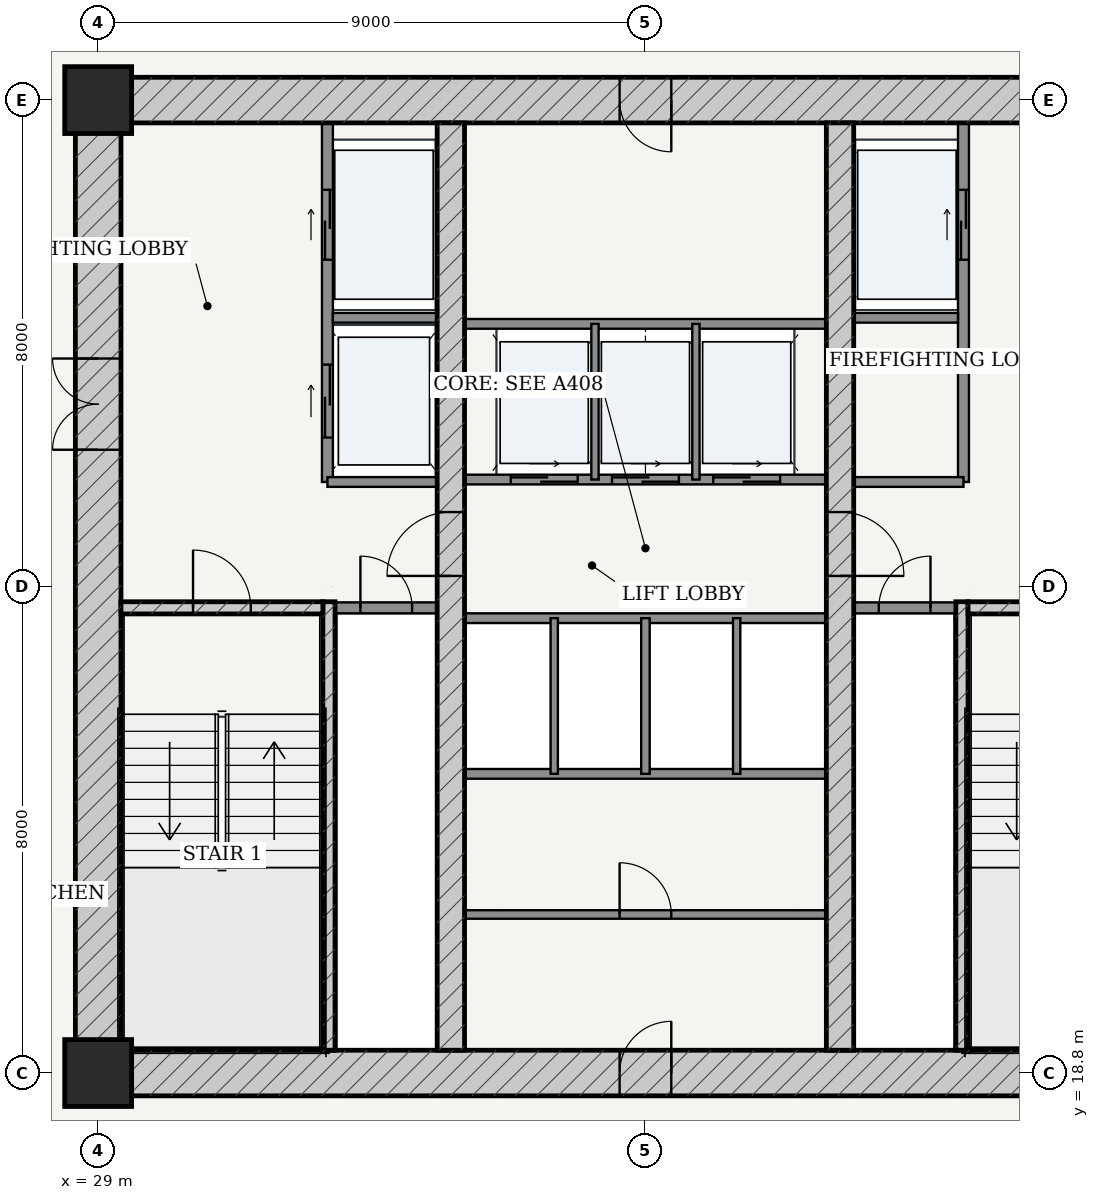
"""IFC4 building model, lengths in metres.
Left out: names, types, materials, properties, quantities, classifications, styles, units other than length and angle.
Written with IfcOpenShell. Run it as: python <this file> out.ifc"""

import sys

from ifc_helpers import new_model, si_unit, direction, frame, frame_2d, origin, origin_2d, place, context, subcontext, project, spatial, rectangle, extrude, source, transform, mapped, element, fill, save


model = new_model("IFC4")
c1 = context("Model", 3, precision=1e-05, world=origin(), true_north=direction((-0.2419218956, 0.970295726276)))
c2 = subcontext(c1, "Body", "Model", "MODEL_VIEW")
j1 = project(units=[si_unit("LENGTHUNIT", "METRE"), si_unit("PLANEANGLEUNIT", "RADIAN")], contexts=[c1])
p1 = place(None, origin())
s1 = spatial("IfcSite", under=j1, at=p1, CompositionType="ELEMENT")
p2 = place(p1, origin())
s2 = spatial("IfcBuilding", under=s1, at=p2, CompositionType="ELEMENT")
p3 = place(p2, frame((0.0, 0.0, 24.0)))
s3 = spatial("IfcBuildingStorey", under=s2, at=p3, CompositionType="ELEMENT", Elevation=24.0)
for number, where, z_axis, x_axis in (
    (1, (29.0, 18.8, 0.0), (0.0, 0.0, 1.0), (1.0, 0.0, 0.0)),
    (2, (29.0, 34.8, 0.0), (0.0, 0.0, 1.0), (1.0, 0.0, 0.0)),
):
    element("IfcColumn", number, at=place(p3, frame(where, z_axis=z_axis, x_axis=x_axis)), inside=s3, PredefinedType="COLUMN", context=c2, shape_type="SweptSolid", body=[
        extrude(rectangle(XDim=1.1, YDim=1.1, at=origin_2d()), origin(), (0.0, 0.0, 1.0), 3.6),
    ])
p4 = place(p3, frame((28.625, 18.8, 0.0), z_axis=(0.0, 0.0, 1.0), x_axis=(1.0, 0.0, 0.0)))
e3 = element("IfcWall", 3, at=p4, inside=s3, PredefinedType="SHEAR", context=c2, shape_type="SweptSolid", body=[
    extrude(rectangle(XDim=18.75, YDim=0.75, at=frame_2d((9.375, 0.0))), origin(), (0.0, 0.0, 1.0), 3.32),
])
p5 = place(p4, frame((8.95, 0.0, 0.0)))
e4 = element("IfcOpeningElement", 4, at=p5, cuts=e3, PredefinedType="OPENING", context=c2, shape_type="SweptSolid", body=[
    extrude(rectangle(XDim=0.85, YDim=2.1, at=frame_2d((0.425, 1.05))), frame((0.0, 0.385, 0.0), z_axis=(0.0, -1.0, 0.0), x_axis=(1.0, 0.0, 0.0)), (0.0, 0.0, 1.0), 0.77),
])
p6 = place(p3, frame((28.625, 34.8, 0.0), z_axis=(0.0, 0.0, 1.0), x_axis=(1.0, 0.0, 0.0)))
e5 = element("IfcWall", 5, at=p6, inside=s3, PredefinedType="SHEAR", context=c2, shape_type="SweptSolid", body=[
    extrude(rectangle(XDim=18.75, YDim=0.75, at=frame_2d((9.375, 0.0))), origin(), (0.0, 0.0, 1.0), 3.32),
])
p7 = place(p6, frame((8.95, 0.0, 0.0)))
e6 = element("IfcOpeningElement", 6, at=p7, cuts=e5, PredefinedType="OPENING", context=c2, shape_type="SweptSolid", body=[
    extrude(rectangle(XDim=0.85, YDim=2.1, at=frame_2d((0.425, 1.05))), frame((0.0, 0.385, 0.0), z_axis=(0.0, -1.0, 0.0), x_axis=(1.0, 0.0, 0.0)), (0.0, 0.0, 1.0), 0.77),
])
p8 = place(p3, frame((29.0, 19.175, 0.0), z_axis=(0.0, 0.0, 1.0), x_axis=(0.0, 1.0, 0.0)))
e7 = element("IfcWall", 7, at=p8, inside=s3, PredefinedType="SHEAR", context=c2, shape_type="SweptSolid", body=[
    extrude(rectangle(XDim=15.25, YDim=0.75, at=frame_2d((7.625, 0.0))), origin(), (0.0, 0.0, 1.0), 3.32),
])
p9 = place(p8, frame((9.875, 0.0, 0.0)))
e8 = element("IfcOpeningElement", 8, at=p9, cuts=e7, PredefinedType="OPENING", context=c2, shape_type="SweptSolid", body=[
    extrude(rectangle(XDim=1.5, YDim=2.2, at=frame_2d((0.75, 1.1))), frame((0.0, 0.385, 0.0), z_axis=(0.0, -1.0, 0.0), x_axis=(1.0, 0.0, 0.0)), (0.0, 0.0, 1.0), 0.77),
])
p10 = place(p3, frame((32.795, 19.175, 0.0), z_axis=(0.0, 0.0, 1.0), x_axis=(0.0, 1.0, 0.0)))
e9 = element("IfcWall", 9, at=p10, inside=s3, PredefinedType="SOLIDWALL", context=c2, shape_type="SweptSolid", body=[
    extrude(rectangle(XDim=7.375, YDim=0.2, at=frame_2d((3.688, 0.0))), origin(), (0.0, 0.0, 1.0), 3.32),
])
p11 = place(p3, frame((29.375, 26.45, 0.0), z_axis=(0.0, 0.0, 1.0), x_axis=(1.0, 0.0, 0.0)))
e10 = element("IfcWall", 10, at=p11, inside=s3, PredefinedType="SOLIDWALL", context=c2, shape_type="SweptSolid", body=[
    extrude(rectangle(XDim=3.32, YDim=0.2, at=frame_2d((1.66, 0.0))), origin(), (0.0, 0.0, 1.0), 3.32),
])
p12 = place(p11, frame((1.185, 0.0, 0.0)))
e11 = element("IfcOpeningElement", 11, at=p12, cuts=e10, PredefinedType="OPENING", context=c2, shape_type="SweptSolid", body=[
    extrude(rectangle(XDim=0.95, YDim=2.15, at=frame_2d((0.475, 1.075))), frame((0.0, 0.11, 0.0), z_axis=(0.0, -1.0, 0.0), x_axis=(1.0, 0.0, 0.0)), (0.0, 0.0, 1.0), 0.22),
])
p13 = place(p3, frame((43.205, 19.175, 0.0), z_axis=(0.0, 0.0, 1.0), x_axis=(0.0, 1.0, 0.0)))
e12 = element("IfcWall", 12, at=p13, inside=s3, PredefinedType="SOLIDWALL", context=c2, shape_type="SweptSolid", body=[
    extrude(rectangle(XDim=7.375, YDim=0.2, at=frame_2d((3.688, 0.0))), origin(), (0.0, 0.0, 1.0), 3.32),
])
p14 = place(p3, frame((43.305, 26.45, 0.0), z_axis=(0.0, 0.0, 1.0), x_axis=(1.0, 0.0, 0.0)))
e13 = element("IfcWall", 13, at=p14, inside=s3, PredefinedType="SOLIDWALL", context=c2, shape_type="SweptSolid", body=[
    extrude(rectangle(XDim=3.32, YDim=0.2, at=frame_2d((1.66, 0.0))), origin(), (0.0, 0.0, 1.0), 3.32),
])
p15 = place(p14, frame((1.185, 0.0, 0.0)))
e14 = element("IfcOpeningElement", 14, at=p15, cuts=e13, PredefinedType="OPENING", context=c2, shape_type="SweptSolid", body=[
    extrude(rectangle(XDim=0.95, YDim=2.15, at=frame_2d((0.475, 1.075))), frame((0.0, 0.11, 0.0), z_axis=(0.0, -1.0, 0.0), x_axis=(1.0, 0.0, 0.0)), (0.0, 0.0, 1.0), 0.22),
])
p16 = place(p3, frame((34.8, 19.175, 0.0), z_axis=(0.0, 0.0, 1.0), x_axis=(0.0, 1.0, 0.0)))
e15 = element("IfcWall", 15, at=p16, inside=s3, PredefinedType="SHEAR", context=c2, shape_type="SweptSolid", body=[
    extrude(rectangle(XDim=15.25, YDim=0.45, at=frame_2d((7.625, 0.0))), origin(), (0.0, 0.0, 1.0), 3.32),
])
p17 = place(p16, frame((7.8, 0.0, 0.0)))
e16 = element("IfcOpeningElement", 16, at=p17, cuts=e15, PredefinedType="OPENING", context=c2, shape_type="SweptSolid", body=[
    extrude(rectangle(XDim=1.05, YDim=2.15, at=frame_2d((0.525, 1.075))), frame((0.0, 0.235, 0.0), z_axis=(0.0, -1.0, 0.0), x_axis=(1.0, 0.0, 0.0)), (0.0, 0.0, 1.0), 0.47),
])
p18 = place(p3, frame((41.2, 19.175, 0.0), z_axis=(0.0, 0.0, 1.0), x_axis=(0.0, 1.0, 0.0)))
e17 = element("IfcWall", 17, at=p18, inside=s3, PredefinedType="SHEAR", context=c2, shape_type="SweptSolid", body=[
    extrude(rectangle(XDim=15.25, YDim=0.45, at=frame_2d((7.625, 0.0))), origin(), (0.0, 0.0, 1.0), 3.32),
])
p19 = place(p18, frame((7.8, 0.0, 0.0)))
e18 = element("IfcOpeningElement", 18, at=p19, cuts=e17, PredefinedType="OPENING", context=c2, shape_type="SweptSolid", body=[
    extrude(rectangle(XDim=1.05, YDim=2.15, at=frame_2d((0.525, 1.075))), frame((0.0, 0.235, 0.0), z_axis=(0.0, -1.0, 0.0), x_axis=(1.0, 0.0, 0.0)), (0.0, 0.0, 1.0), 0.47),
])
p20 = place(p3, frame((32.9, 26.45, 0.0), z_axis=(0.0, 0.0, 1.0), x_axis=(1.0, 0.0, 0.0)))
e19 = element("IfcWall", 19, at=p20, inside=s3, PredefinedType="PARTITIONING", context=c2, shape_type="SweptSolid", body=[
    extrude(rectangle(XDim=1.675, YDim=0.18, at=frame_2d((0.837, 0.0))), origin(), (0.0, 0.0, 1.0), 3.32),
])
p21 = place(p20, frame((0.413, 0.0, 0.0)))
e20 = element("IfcOpeningElement", 20, at=p21, cuts=e19, PredefinedType="OPENING", context=c2, shape_type="SweptSolid", body=[
    extrude(rectangle(XDim=0.85, YDim=2.1, at=frame_2d((0.425, 1.05))), frame((0.0, 0.1, 0.0), z_axis=(0.0, -1.0, 0.0), x_axis=(1.0, 0.0, 0.0)), (0.0, 0.0, 1.0), 0.2),
])
p22 = place(p3, frame((41.425, 26.45, 0.0), z_axis=(0.0, 0.0, 1.0), x_axis=(1.0, 0.0, 0.0)))
e21 = element("IfcWall", 21, at=p22, inside=s3, PredefinedType="PARTITIONING", context=c2, shape_type="SweptSolid", body=[
    extrude(rectangle(XDim=1.675, YDim=0.18, at=frame_2d((0.837, 0.0))), origin(), (0.0, 0.0, 1.0), 3.32),
])
p23 = place(p22, frame((0.413, 0.0, 0.0)))
e22 = element("IfcOpeningElement", 22, at=p23, cuts=e21, PredefinedType="OPENING", context=c2, shape_type="SweptSolid", body=[
    extrude(rectangle(XDim=0.85, YDim=2.1, at=frame_2d((0.425, 1.05))), frame((0.0, 0.1, 0.0), z_axis=(0.0, -1.0, 0.0), x_axis=(1.0, 0.0, 0.0)), (0.0, 0.0, 1.0), 0.2),
])
p24 = place(p3, frame((32.77, 28.52, 0.0), z_axis=(0.0, 0.0, 1.0), x_axis=(0.0, 1.0, 0.0)))
e23 = element("IfcWall", 23, at=p24, inside=s3, PredefinedType="PARTITIONING", context=c2, shape_type="SweptSolid", body=[
    extrude(rectangle(XDim=5.905, YDim=0.18, at=frame_2d((2.953, 0.0))), origin(), (0.0, 0.0, 1.0), 3.32),
])
p25 = place(p24, frame((3.655, 0.0, 0.0)))
e24 = element("IfcOpeningElement", 24, at=p25, cuts=e23, PredefinedType="OPENING", context=c2, shape_type="SweptSolid", body=[
    extrude(rectangle(XDim=1.15, YDim=2.2, at=frame_2d((0.575, 1.1))), frame((0.0, 0.1, 0.0), z_axis=(0.0, -1.0, 0.0), x_axis=(1.0, 0.0, 0.0)), (0.0, 0.0, 1.0), 0.2),
])
p26 = place(p24, frame((0.73, 0.0, 0.0)))
e25 = element("IfcOpeningElement", 25, at=p26, cuts=e23, PredefinedType="OPENING", context=c2, shape_type="SweptSolid", body=[
    extrude(rectangle(XDim=1.2, YDim=2.25, at=frame_2d((0.6, 1.125))), frame((0.0, 0.1, 0.0), z_axis=(0.0, -1.0, 0.0), x_axis=(1.0, 0.0, 0.0)), (0.0, 0.0, 1.0), 0.2),
])
p27 = place(p3, frame((32.86, 31.22, 0.0), z_axis=(0.0, 0.0, 1.0), x_axis=(1.0, 0.0, 0.0)))
e26 = element("IfcWall", 26, at=p27, inside=s3, PredefinedType="PARTITIONING", context=c2, shape_type="SweptSolid", body=[
    extrude(rectangle(XDim=1.715, YDim=0.16, at=frame_2d((0.857, 0.0))), origin(), (0.0, 0.0, 1.0), 3.32),
])
p28 = place(p3, frame((32.77, 28.52, 0.0), z_axis=(0.0, 0.0, 1.0), x_axis=(1.0, 0.0, 0.0)))
e27 = element("IfcWall", 27, at=p28, inside=s3, PredefinedType="PARTITIONING", context=c2, shape_type="SweptSolid", body=[
    extrude(rectangle(XDim=1.805, YDim=0.16, at=frame_2d((0.902, 0.0))), origin(), (0.0, 0.0, 1.0), 3.32),
])
p29 = place(p3, frame((43.23, 28.52, 0.0), z_axis=(0.0, 0.0, 1.0), x_axis=(0.0, 1.0, 0.0)))
e28 = element("IfcWall", 28, at=p29, inside=s3, PredefinedType="PARTITIONING", context=c2, shape_type="SweptSolid", body=[
    extrude(rectangle(XDim=5.905, YDim=0.18, at=frame_2d((2.953, 0.0))), origin(), (0.0, 0.0, 1.0), 3.32),
])
p30 = place(p29, frame((3.655, 0.0, 0.0)))
e29 = element("IfcOpeningElement", 29, at=p30, cuts=e28, PredefinedType="OPENING", context=c2, shape_type="SweptSolid", body=[
    extrude(rectangle(XDim=1.15, YDim=2.2, at=frame_2d((0.575, 1.1))), frame((0.0, 0.1, 0.0), z_axis=(0.0, -1.0, 0.0), x_axis=(1.0, 0.0, 0.0)), (0.0, 0.0, 1.0), 0.2),
])
p31 = place(p3, frame((41.425, 31.22, 0.0), z_axis=(0.0, 0.0, 1.0), x_axis=(1.0, 0.0, 0.0)))
e30 = element("IfcWall", 30, at=p31, inside=s3, PredefinedType="PARTITIONING", context=c2, shape_type="SweptSolid", body=[
    extrude(rectangle(XDim=1.715, YDim=0.16, at=frame_2d((0.857, 0.0))), origin(), (0.0, 0.0, 1.0), 3.32),
])
p32 = place(p3, frame((41.425, 28.52, 0.0), z_axis=(0.0, 0.0, 1.0), x_axis=(1.0, 0.0, 0.0)))
e31 = element("IfcWall", 31, at=p32, inside=s3, PredefinedType="PARTITIONING", context=c2, shape_type="SweptSolid", body=[
    extrude(rectangle(XDim=1.805, YDim=0.16, at=frame_2d((0.902, 0.0))), origin(), (0.0, 0.0, 1.0), 3.32),
])
p33 = place(p3, frame((35.025, 28.56, 0.0), z_axis=(0.0, 0.0, 1.0), x_axis=(1.0, 0.0, 0.0)))
e32 = element("IfcWall", 32, at=p33, inside=s3, PredefinedType="PARTITIONING", context=c2, shape_type="SweptSolid", body=[
    extrude(rectangle(XDim=5.95, YDim=0.16, at=frame_2d((2.975, 0.0))), origin(), (0.0, 0.0, 1.0), 3.32),
])
p34 = place(p33, frame((0.76, 0.0, 0.0)))
e33 = element("IfcOpeningElement", 33, at=p34, cuts=e32, PredefinedType="OPENING", context=c2, shape_type="SweptSolid", body=[
    extrude(rectangle(XDim=1.1, YDim=2.2, at=frame_2d((0.55, 1.1))), frame((0.0, 0.09, 0.0), z_axis=(0.0, -1.0, 0.0), x_axis=(1.0, 0.0, 0.0)), (0.0, 0.0, 1.0), 0.18),
])
p35 = place(p33, frame((2.425, 0.0, 0.0)))
e34 = element("IfcOpeningElement", 34, at=p35, cuts=e32, PredefinedType="OPENING", context=c2, shape_type="SweptSolid", body=[
    extrude(rectangle(XDim=1.1, YDim=2.2, at=frame_2d((0.55, 1.1))), frame((0.0, 0.09, 0.0), z_axis=(0.0, -1.0, 0.0), x_axis=(1.0, 0.0, 0.0)), (0.0, 0.0, 1.0), 0.18),
])
p36 = place(p33, frame((4.09, 0.0, 0.0)))
e35 = element("IfcOpeningElement", 35, at=p36, cuts=e32, PredefinedType="OPENING", context=c2, shape_type="SweptSolid", body=[
    extrude(rectangle(XDim=1.1, YDim=2.2, at=frame_2d((0.55, 1.1))), frame((0.0, 0.09, 0.0), z_axis=(0.0, -1.0, 0.0), x_axis=(1.0, 0.0, 0.0)), (0.0, 0.0, 1.0), 0.18),
])
p37 = place(p3, frame((35.025, 31.12, 0.0), z_axis=(0.0, 0.0, 1.0), x_axis=(1.0, 0.0, 0.0)))
e36 = element("IfcWall", 36, at=p37, inside=s3, PredefinedType="PARTITIONING", context=c2, shape_type="SweptSolid", body=[
    extrude(rectangle(XDim=5.95, YDim=0.16, at=frame_2d((2.975, 0.0))), origin(), (0.0, 0.0, 1.0), 3.32),
])
for number, where, z_axis, x_axis in (
    (37, (37.17, 28.56, 0.0), (0.0, 0.0, 1.0), (0.0, 1.0, 0.0)),
    (38, (38.83, 28.56, 0.0), (0.0, 0.0, 1.0), (0.0, 1.0, 0.0)),
):
    element("IfcWall", number, at=place(p3, frame(where, z_axis=z_axis, x_axis=x_axis)), inside=s3, PredefinedType="PARTITIONING", context=c2, shape_type="SweptSolid", body=[
        extrude(rectangle(XDim=2.56, YDim=0.12, at=frame_2d((1.28, 0.0))), origin(), (0.0, 0.0, 1.0), 3.32),
    ])
for number, where, z_axis, x_axis in (
    (39, (35.025, 26.28, 0.0), (0.0, 0.0, 1.0), (1.0, 0.0, 0.0)),
    (40, (35.025, 23.72, 0.0), (0.0, 0.0, 1.0), (1.0, 0.0, 0.0)),
):
    element("IfcWall", number, at=place(p3, frame(where, z_axis=z_axis, x_axis=x_axis)), inside=s3, PredefinedType="PARTITIONING", context=c2, shape_type="SweptSolid", body=[
        extrude(rectangle(XDim=5.95, YDim=0.16, at=frame_2d((2.975, 0.0))), origin(), (0.0, 0.0, 1.0), 3.32),
    ])
p38 = place(p3, frame((36.5, 23.72, 0.0), z_axis=(0.0, 0.0, 1.0), x_axis=(0.0, 1.0, 0.0)))
e41 = element("IfcWall", 41, at=p38, inside=s3, PredefinedType="PARTITIONING", context=c2, shape_type="SweptSolid", body=[
    extrude(rectangle(XDim=2.56, YDim=0.12, at=frame_2d((1.28, 0.0))), origin(), (0.0, 0.0, 1.0), 3.32),
])
p39 = place(p3, frame((38.0, 23.72, 0.0), z_axis=(0.0, 0.0, 1.0), x_axis=(0.0, 1.0, 0.0)))
e42 = element("IfcWall", 42, at=p39, inside=s3, PredefinedType="PARTITIONING", context=c2, shape_type="SweptSolid", body=[
    extrude(rectangle(XDim=2.56, YDim=0.14, at=frame_2d((1.28, 0.0))), origin(), (0.0, 0.0, 1.0), 3.32),
])
p40 = place(p3, frame((39.5, 23.72, 0.0), z_axis=(0.0, 0.0, 1.0), x_axis=(0.0, 1.0, 0.0)))
e43 = element("IfcWall", 43, at=p40, inside=s3, PredefinedType="PARTITIONING", context=c2, shape_type="SweptSolid", body=[
    extrude(rectangle(XDim=2.56, YDim=0.12, at=frame_2d((1.28, 0.0))), origin(), (0.0, 0.0, 1.0), 3.32),
])
p41 = place(p3, frame((35.025, 21.407, 0.0), z_axis=(0.0, 0.0, 1.0), x_axis=(1.0, 0.0, 0.0)))
e44 = element("IfcWall", 44, at=p41, inside=s3, PredefinedType="PARTITIONING", context=c2, shape_type="SweptSolid", body=[
    extrude(rectangle(XDim=5.95, YDim=0.14, at=frame_2d((2.975, 0.0))), origin(), (0.0, 0.0, 1.0), 3.32),
])
p42 = place(p41, frame((2.55, 0.0, 0.0)))
e45 = element("IfcOpeningElement", 45, at=p42, cuts=e44, PredefinedType="OPENING", context=c2, shape_type="SweptSolid", body=[
    extrude(rectangle(XDim=0.85, YDim=2.1, at=frame_2d((0.425, 1.05))), frame((0.0, 0.08, 0.0), z_axis=(0.0, -1.0, 0.0), x_axis=(1.0, 0.0, 0.0)), (0.0, 0.0, 1.0), 0.16),
])
m1 = source(origin(), c2, "Body", "SweptSolid", [
    extrude(rectangle(XDim=1.5, YDim=2.2, at=frame_2d((0.75, 1.1))), frame((0.0, 0.025, 0.0), z_axis=(0.0, -1.0, 0.0), x_axis=(1.0, 0.0, 0.0)), (0.0, 0.0, 1.0), 0.05),
])
p43 = place(p9, origin())
e46 = element("IfcDoor", 46, at=p43, inside=s3, OperationType="DOUBLE_DOOR_SINGLE_SWING", PredefinedType="DOOR", context=c2, shape_type="MappedRepresentation", body=[
    mapped(m1, transform((0.0, 0.0, 0.0), scale=1.0)),
])
fill(e8, e46)
m2 = source(origin(), c2, "Body", "SweptSolid", [
    extrude(rectangle(XDim=1.05, YDim=2.15, at=frame_2d((0.525, 1.075))), frame((0.0, 0.025, 0.0), z_axis=(0.0, -1.0, 0.0), x_axis=(1.0, 0.0, 0.0)), (0.0, 0.0, 1.0), 0.05),
])
p44 = place(p17, origin())
e47 = element("IfcDoor", 47, at=p44, inside=s3, OperationType="SINGLE_SWING_LEFT", PredefinedType="DOOR", context=c2, shape_type="MappedRepresentation", body=[
    mapped(m2, transform((0.0, 0.0, 0.0), scale=1.0)),
])
fill(e16, e47)
p45 = place(p19, frame((1.05, 0.0, 0.0), z_axis=(0.0, 0.0, 1.0), x_axis=(-1.0, 0.0, 0.0)))
e48 = element("IfcDoor", 48, at=p45, inside=s3, OperationType="SINGLE_SWING_RIGHT", PredefinedType="DOOR", context=c2, shape_type="MappedRepresentation", body=[
    mapped(m2, transform((0.0, 0.0, 0.0), scale=1.0)),
])
fill(e18, e48)
m3 = source(origin(), c2, "Body", "SweptSolid", [
    extrude(rectangle(XDim=0.95, YDim=2.15, at=frame_2d((0.475, 1.075))), frame((0.0, 0.025, 0.0), z_axis=(0.0, -1.0, 0.0), x_axis=(1.0, 0.0, 0.0)), (0.0, 0.0, 1.0), 0.05),
])
p46 = place(p12, origin())
e49 = element("IfcDoor", 49, at=p46, inside=s3, OperationType="SINGLE_SWING_LEFT", PredefinedType="DOOR", context=c2, shape_type="MappedRepresentation", body=[
    mapped(m3, transform((0.0, 0.0, 0.0), scale=1.0)),
])
fill(e11, e49)
m4 = source(origin(), c2, "Body", "SweptSolid", [
    extrude(rectangle(XDim=0.85, YDim=2.1, at=frame_2d((0.425, 1.05))), frame((0.0, 0.025, 0.0), z_axis=(0.0, -1.0, 0.0), x_axis=(1.0, 0.0, 0.0)), (0.0, 0.0, 1.0), 0.05),
])
p47 = place(p21, origin())
e50 = element("IfcDoor", 50, at=p47, inside=s3, OperationType="SINGLE_SWING_LEFT", PredefinedType="DOOR", context=c2, shape_type="MappedRepresentation", body=[
    mapped(m4, transform((0.0, 0.0, 0.0), scale=1.0)),
])
fill(e20, e50)
p48 = place(p23, origin())
e51 = element("IfcDoor", 51, at=p48, inside=s3, OperationType="SINGLE_SWING_RIGHT", PredefinedType="DOOR", context=c2, shape_type="MappedRepresentation", body=[
    mapped(m4, transform((0.0, 0.0, 0.0), scale=1.0)),
])
fill(e22, e51)
p49 = place(p7, frame((0.85, 0.0, 0.0), z_axis=(0.0, 0.0, 1.0), x_axis=(-1.0, 0.0, 0.0)))
e52 = element("IfcDoor", 52, at=p49, inside=s3, OperationType="SINGLE_SWING_LEFT", PredefinedType="DOOR", context=c2, shape_type="MappedRepresentation", body=[
    mapped(m4, transform((0.0, 0.0, 0.0), scale=1.0)),
])
fill(e6, e52)
p50 = place(p5, origin())
e53 = element("IfcDoor", 53, at=p50, inside=s3, OperationType="SINGLE_SWING_RIGHT", PredefinedType="DOOR", context=c2, shape_type="MappedRepresentation", body=[
    mapped(m4, transform((0.0, 0.0, 0.0), scale=1.0)),
])
fill(e4, e53)
p51 = place(p42, origin())
e54 = element("IfcDoor", 54, at=p51, inside=s3, OperationType="SINGLE_SWING_LEFT", PredefinedType="DOOR", context=c2, shape_type="MappedRepresentation", body=[
    mapped(m4, transform((0.0, 0.0, 0.0), scale=1.0)),
])
fill(e45, e54)
m5 = source(origin(), c2, "Body", "SweptSolid", [
    extrude(rectangle(XDim=1.15, YDim=2.2, at=frame_2d((0.575, 1.1))), frame((0.0, 0.025, 0.0), z_axis=(0.0, -1.0, 0.0), x_axis=(1.0, 0.0, 0.0)), (0.0, 0.0, 1.0), 0.05),
])
p52 = place(p25, origin())
e55 = element("IfcDoor", 55, at=p52, inside=s3, OperationType="DOUBLE_DOOR_SLIDING", PredefinedType="DOOR", context=c2, shape_type="MappedRepresentation", body=[
    mapped(m5, transform((0.0, 0.0, 0.0), scale=1.0)),
])
fill(e24, e55)
p53 = place(p30, origin())
e56 = element("IfcDoor", 56, at=p53, inside=s3, OperationType="DOUBLE_DOOR_SLIDING", PredefinedType="DOOR", context=c2, shape_type="MappedRepresentation", body=[
    mapped(m5, transform((0.0, 0.0, 0.0), scale=1.0)),
])
fill(e29, e56)
m6 = source(origin(), c2, "Body", "SweptSolid", [
    extrude(rectangle(XDim=1.2, YDim=2.25, at=frame_2d((0.6, 1.125))), frame((0.0, 0.025, 0.0), z_axis=(0.0, -1.0, 0.0), x_axis=(1.0, 0.0, 0.0)), (0.0, 0.0, 1.0), 0.05),
])
p54 = place(p26, origin())
e57 = element("IfcDoor", 57, at=p54, inside=s3, OperationType="DOUBLE_DOOR_SLIDING", PredefinedType="DOOR", context=c2, shape_type="MappedRepresentation", body=[
    mapped(m6, transform((0.0, 0.0, 0.0), scale=1.0)),
])
fill(e25, e57)
m7 = source(origin(), c2, "Body", "SweptSolid", [
    extrude(rectangle(XDim=1.1, YDim=2.2, at=frame_2d((0.55, 1.1))), frame((0.0, 0.025, 0.0), z_axis=(0.0, -1.0, 0.0), x_axis=(1.0, 0.0, 0.0)), (0.0, 0.0, 1.0), 0.05),
])
p55 = place(p34, origin())
e58 = element("IfcDoor", 58, at=p55, inside=s3, OperationType="DOUBLE_DOOR_SLIDING", PredefinedType="DOOR", context=c2, shape_type="MappedRepresentation", body=[
    mapped(m7, transform((0.0, 0.0, 0.0), scale=1.0)),
])
fill(e33, e58)
p56 = place(p35, origin())
e59 = element("IfcDoor", 59, at=p56, inside=s3, OperationType="DOUBLE_DOOR_SLIDING", PredefinedType="DOOR", context=c2, shape_type="MappedRepresentation", body=[
    mapped(m7, transform((0.0, 0.0, 0.0), scale=1.0)),
])
fill(e34, e59)
p57 = place(p36, origin())
e60 = element("IfcDoor", 60, at=p57, inside=s3, OperationType="DOUBLE_DOOR_SLIDING", PredefinedType="DOOR", context=c2, shape_type="MappedRepresentation", body=[
    mapped(m7, transform((0.0, 0.0, 0.0), scale=1.0)),
])
fill(e35, e60)
save(model, sys.argv[1])
